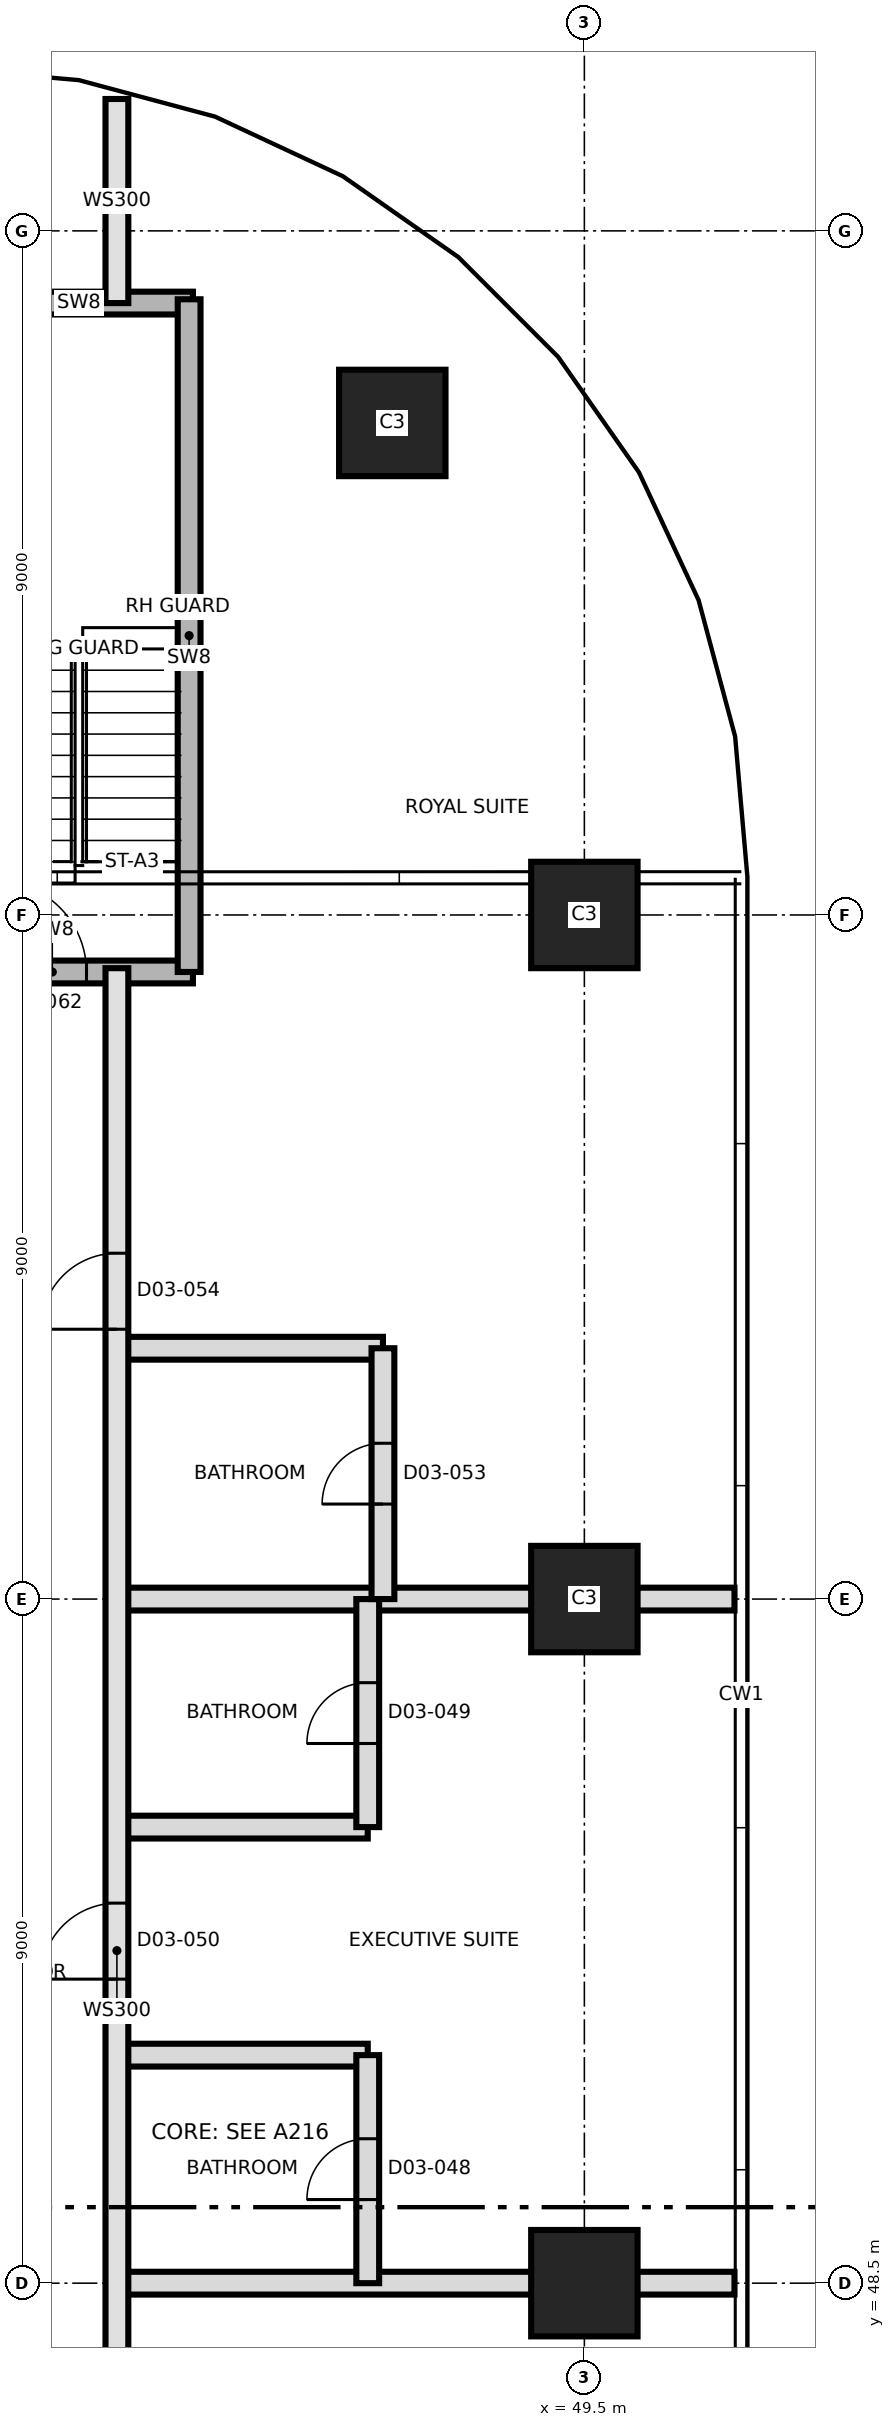
"""IFC4 building model, lengths in metres.
Left out: names, types, materials, properties, quantities, classifications, styles, units other than length and angle.
Written with IfcOpenShell. Run it as: python <this file> out.ifc"""

import sys

from ifc_helpers import new_model, si_unit, direction, frame, frame_2d, origin, origin_2d, place, context, subcontext, project, spatial, rectangle, extrude, element, fill, save


model = new_model("IFC4")
c1 = context("Model", 3, precision=1e-05, world=origin(), true_north=direction((0.0, 1.0)))
c2 = subcontext(c1, "Body", "Model", "MODEL_VIEW")
j1 = project(units=[si_unit("LENGTHUNIT", "METRE"), si_unit("PLANEANGLEUNIT", "RADIAN")], contexts=[c1])
p1 = place(None, origin())
s1 = spatial("IfcSite", under=j1, at=p1, CompositionType="ELEMENT")
p2 = place(p1, origin())
s2 = spatial("IfcBuilding", under=s1, at=p2, CompositionType="ELEMENT")
p3 = place(p2, frame((0.0, 0.0, 59.4)))
s3 = spatial("IfcBuildingStorey", under=s2, at=p3, CompositionType="ELEMENT", Elevation=59.4)
for number, where, z_axis, x_axis in (
    (1, (49.5, 48.5, 0.0), (0.0, 0.0, 1.0), (1.0, 0.0, 0.0)),
    (2, (49.5, 57.5, 0.0), (0.0, 0.0, 1.0), (1.0, 0.0, 0.0)),
    (3, (49.5, 66.5, 0.0), (0.0, 0.0, 1.0), (1.0, 0.0, 0.0)),
    (4, (46.973, 72.973, 0.0), (0.0, 0.0, 1.0), (1.0, 0.0, 0.0)),
):
    element("IfcColumn", number, at=place(p3, frame(where, z_axis=z_axis, x_axis=x_axis)), inside=s3, PredefinedType="COLUMN", context=c2, shape_type="SweptSolid", body=[
        extrude(rectangle(XDim=1.4, YDim=1.4, at=origin_2d()), origin(), (0.0, 0.0, 1.0), 3.7),
    ])
p4 = place(p3, frame((43.35, 48.5, 0.0), z_axis=(0.0, 0.0, 1.0), x_axis=(1.0, 0.0, 0.0)))
e5 = element("IfcWall", 5, at=p4, inside=s3, PredefinedType="PARTITIONING", context=c2, shape_type="SweptSolid", body=[
    extrude(rectangle(XDim=8.125, YDim=0.3, at=frame_2d((4.062, 0.0))), origin(), (0.0, 0.0, 1.0), 3.4),
])
for number, where, z_axis, x_axis in (
    (6, (43.35, 51.5, 0.0), (0.0, 0.0, 1.0), (1.0, 0.0, 0.0)),
    (7, (43.35, 54.5, 0.0), (0.0, 0.0, 1.0), (1.0, 0.0, 0.0)),
):
    element("IfcWall", number, at=place(p3, frame(where, z_axis=z_axis, x_axis=x_axis)), inside=s3, PredefinedType="PARTITIONING", context=c2, shape_type="SweptSolid", body=[
        extrude(rectangle(XDim=3.3, YDim=0.3, at=frame_2d((1.65, 0.0))), origin(), (0.0, 0.0, 1.0), 3.4),
    ])
p5 = place(p3, frame((43.35, 57.5, 0.0), z_axis=(0.0, 0.0, 1.0), x_axis=(1.0, 0.0, 0.0)))
e8 = element("IfcWall", 8, at=p5, inside=s3, PredefinedType="PARTITIONING", context=c2, shape_type="SweptSolid", body=[
    extrude(rectangle(XDim=8.125, YDim=0.3, at=frame_2d((4.062, 0.0))), origin(), (0.0, 0.0, 1.0), 3.4),
])
p6 = place(p3, frame((43.35, 60.8, 0.0), z_axis=(0.0, 0.0, 1.0), x_axis=(1.0, 0.0, 0.0)))
e9 = element("IfcWall", 9, at=p6, inside=s3, PredefinedType="PARTITIONING", context=c2, shape_type="SweptSolid", body=[
    extrude(rectangle(XDim=3.5, YDim=0.3, at=frame_2d((1.75, 0.0))), origin(), (0.0, 0.0, 1.0), 3.4),
])
p7 = place(p3, frame((40.65, 65.75, 0.0), z_axis=(0.0, 0.0, 1.0), x_axis=(1.0, 0.0, 0.0)))
e10 = element("IfcWall", 10, at=p7, inside=s3, PredefinedType="SHEAR", context=c2, shape_type="SweptSolid", body=[
    extrude(rectangle(XDim=3.7, YDim=0.3, at=frame_2d((1.85, 0.0))), origin(), (0.0, 0.0, 1.0), 3.4),
])
p8 = place(p7, frame((1.1, 0.0, 0.0)))
e11 = element("IfcOpeningElement", 11, at=p8, cuts=e10, PredefinedType="OPENING", context=c2, shape_type="SweptSolid", body=[
    extrude(rectangle(XDim=1.2, YDim=2.1, at=frame_2d((0.6, 1.05))), frame((0.0, 0.16, 0.0), z_axis=(0.0, -1.0, 0.0), x_axis=(1.0, 0.0, 0.0)), (0.0, 0.0, 1.0), 0.32),
])
p9 = place(p3, frame((41.35, 74.55, 0.0), z_axis=(0.0, 0.0, 1.0), x_axis=(1.0, 0.0, 0.0)))
e12 = element("IfcWall", 12, at=p9, inside=s3, PredefinedType="SHEAR", context=c2, shape_type="SweptSolid", body=[
    extrude(rectangle(XDim=3.0, YDim=0.3, at=frame_2d((1.5, 0.0))), origin(), (0.0, 0.0, 1.0), 3.4),
])
p10 = place(p3, frame((43.35, 39.95, 0.0), z_axis=(0.0, 0.0, 1.0), x_axis=(0.0, 1.0, 0.0)))
e13 = element("IfcWall", 13, at=p10, inside=s3, PredefinedType="SOLIDWALL", context=c2, shape_type="SweptSolid", body=[
    extrude(rectangle(XDim=25.85, YDim=0.3, at=frame_2d((12.925, 0.0))), origin(), (0.0, 0.0, 1.0), 3.4),
])
p11 = place(p10, frame((0.7, 0.0, 0.0)))
e14 = element("IfcOpeningElement", 14, at=p11, cuts=e13, PredefinedType="OPENING", context=c2, shape_type="SweptSolid", body=[
    extrude(rectangle(XDim=1.0, YDim=2.1, at=frame_2d((0.5, 1.05))), frame((0.0, 0.16, 0.0), z_axis=(0.0, -1.0, 0.0), x_axis=(1.0, 0.0, 0.0)), (0.0, 0.0, 1.0), 0.32),
])
p12 = place(p10, frame((6.55, 0.0, 0.0)))
e15 = element("IfcOpeningElement", 15, at=p12, cuts=e13, PredefinedType="OPENING", context=c2, shape_type="SweptSolid", body=[
    extrude(rectangle(XDim=1.0, YDim=2.1, at=frame_2d((0.5, 1.05))), frame((0.0, 0.16, 0.0), z_axis=(0.0, -1.0, 0.0), x_axis=(1.0, 0.0, 0.0)), (0.0, 0.0, 1.0), 0.32),
])
p13 = place(p10, frame((12.55, 0.0, 0.0)))
e16 = element("IfcOpeningElement", 16, at=p13, cuts=e13, PredefinedType="OPENING", context=c2, shape_type="SweptSolid", body=[
    extrude(rectangle(XDim=1.0, YDim=2.4, at=frame_2d((0.5, 1.2))), frame((0.0, 0.16, 0.0), z_axis=(0.0, -1.0, 0.0), x_axis=(1.0, 0.0, 0.0)), (0.0, 0.0, 1.0), 0.32),
])
p14 = place(p10, frame((21.1, 0.0, 0.0)))
e17 = element("IfcOpeningElement", 17, at=p14, cuts=e13, PredefinedType="OPENING", context=c2, shape_type="SweptSolid", body=[
    extrude(rectangle(XDim=1.0, YDim=2.4, at=frame_2d((0.5, 1.2))), frame((0.0, 0.16, 0.0), z_axis=(0.0, -1.0, 0.0), x_axis=(1.0, 0.0, 0.0)), (0.0, 0.0, 1.0), 0.32),
])
p15 = place(p3, frame((43.35, 74.55, 0.0), z_axis=(0.0, 0.0, 1.0), x_axis=(0.0, 1.0, 0.0)))
e18 = element("IfcWall", 18, at=p15, inside=s3, PredefinedType="SOLIDWALL", context=c2, shape_type="SweptSolid", body=[
    extrude(rectangle(XDim=2.685, YDim=0.3, at=frame_2d((1.343, 0.0))), origin(), (0.0, 0.0, 1.0), 3.4),
])
p16 = place(p3, frame((44.3, 65.75, 0.0), z_axis=(0.0, 0.0, 1.0), x_axis=(0.0, 1.0, 0.0)))
e19 = element("IfcWall", 19, at=p16, inside=s3, PredefinedType="SHEAR", context=c2, shape_type="SweptSolid", body=[
    extrude(rectangle(XDim=8.85, YDim=0.3, at=frame_2d((4.425, 0.0))), origin(), (0.0, 0.0, 1.0), 3.4),
])
p17 = place(p3, frame((46.65, 48.5, 0.0), z_axis=(0.0, 0.0, 1.0), x_axis=(0.0, 1.0, 0.0)))
e20 = element("IfcWall", 20, at=p17, inside=s3, PredefinedType="PARTITIONING", context=c2, shape_type="SweptSolid", body=[
    extrude(rectangle(XDim=3.0, YDim=0.3, at=frame_2d((1.5, 0.0))), origin(), (0.0, 0.0, 1.0), 3.4),
])
p18 = place(p17, frame((1.1, 0.0, 0.0)))
e21 = element("IfcOpeningElement", 21, at=p18, cuts=e20, PredefinedType="OPENING", context=c2, shape_type="SweptSolid", body=[
    extrude(rectangle(XDim=0.8, YDim=2.1, at=frame_2d((0.4, 1.05))), frame((0.0, 0.16, 0.0), z_axis=(0.0, -1.0, 0.0), x_axis=(1.0, 0.0, 0.0)), (0.0, 0.0, 1.0), 0.32),
])
p19 = place(p3, frame((46.65, 54.5, 0.0), z_axis=(0.0, 0.0, 1.0), x_axis=(0.0, 1.0, 0.0)))
e22 = element("IfcWall", 22, at=p19, inside=s3, PredefinedType="PARTITIONING", context=c2, shape_type="SweptSolid", body=[
    extrude(rectangle(XDim=3.0, YDim=0.3, at=frame_2d((1.5, 0.0))), origin(), (0.0, 0.0, 1.0), 3.4),
])
p20 = place(p19, frame((1.1, 0.0, 0.0)))
e23 = element("IfcOpeningElement", 23, at=p20, cuts=e22, PredefinedType="OPENING", context=c2, shape_type="SweptSolid", body=[
    extrude(rectangle(XDim=0.8, YDim=2.1, at=frame_2d((0.4, 1.05))), frame((0.0, 0.16, 0.0), z_axis=(0.0, -1.0, 0.0), x_axis=(1.0, 0.0, 0.0)), (0.0, 0.0, 1.0), 0.32),
])
p21 = place(p3, frame((46.85, 57.5, 0.0), z_axis=(0.0, 0.0, 1.0), x_axis=(0.0, 1.0, 0.0)))
e24 = element("IfcWall", 24, at=p21, inside=s3, PredefinedType="PARTITIONING", context=c2, shape_type="SweptSolid", body=[
    extrude(rectangle(XDim=3.3, YDim=0.3, at=frame_2d((1.65, 0.0))), origin(), (0.0, 0.0, 1.0), 3.4),
])
p22 = place(p21, frame((1.25, 0.0, 0.0)))
e25 = element("IfcOpeningElement", 25, at=p22, cuts=e24, PredefinedType="OPENING", context=c2, shape_type="SweptSolid", body=[
    extrude(rectangle(XDim=0.8, YDim=2.1, at=frame_2d((0.4, 1.05))), frame((0.0, 0.16, 0.0), z_axis=(0.0, -1.0, 0.0), x_axis=(1.0, 0.0, 0.0)), (0.0, 0.0, 1.0), 0.32),
])
p23 = place(p18, origin())
e26 = element("IfcDoor", 26, at=p23, inside=s3, OperationType="SINGLE_SWING_RIGHT", PredefinedType="DOOR", context=c2, shape_type="SweptSolid", body=[
    extrude(rectangle(XDim=0.8, YDim=2.1, at=frame_2d((0.4, 1.05))), frame((0.0, 0.025, 0.0), z_axis=(0.0, -1.0, 0.0), x_axis=(1.0, 0.0, 0.0)), (0.0, 0.0, 1.0), 0.05),
])
fill(e21, e26)
p24 = place(p20, origin())
e27 = element("IfcDoor", 27, at=p24, inside=s3, OperationType="SINGLE_SWING_LEFT", PredefinedType="DOOR", context=c2, shape_type="SweptSolid", body=[
    extrude(rectangle(XDim=0.8, YDim=2.1, at=frame_2d((0.4, 1.05))), frame((0.0, 0.025, 0.0), z_axis=(0.0, -1.0, 0.0), x_axis=(1.0, 0.0, 0.0)), (0.0, 0.0, 1.0), 0.05),
])
fill(e23, e27)
p25 = place(p13, origin())
e28 = element("IfcDoor", 28, at=p25, inside=s3, OperationType="SINGLE_SWING_LEFT", PredefinedType="DOOR", context=c2, shape_type="SweptSolid", body=[
    extrude(rectangle(XDim=1.0, YDim=2.4, at=frame_2d((0.5, 1.2))), frame((0.0, 0.025, 0.0), z_axis=(0.0, -1.0, 0.0), x_axis=(1.0, 0.0, 0.0)), (0.0, 0.0, 1.0), 0.05),
])
fill(e16, e28)
p26 = place(p22, origin())
e29 = element("IfcDoor", 29, at=p26, inside=s3, OperationType="SINGLE_SWING_LEFT", PredefinedType="DOOR", context=c2, shape_type="SweptSolid", body=[
    extrude(rectangle(XDim=0.8, YDim=2.1, at=frame_2d((0.4, 1.05))), frame((0.0, 0.025, 0.0), z_axis=(0.0, -1.0, 0.0), x_axis=(1.0, 0.0, 0.0)), (0.0, 0.0, 1.0), 0.05),
])
fill(e25, e29)
p27 = place(p14, origin())
e30 = element("IfcDoor", 30, at=p27, inside=s3, OperationType="SINGLE_SWING_LEFT", PredefinedType="DOOR", context=c2, shape_type="SweptSolid", body=[
    extrude(rectangle(XDim=1.0, YDim=2.4, at=frame_2d((0.5, 1.2))), frame((0.0, 0.025, 0.0), z_axis=(0.0, -1.0, 0.0), x_axis=(1.0, 0.0, 0.0)), (0.0, 0.0, 1.0), 0.05),
])
fill(e17, e30)
p28 = place(p8, origin())
e31 = element("IfcDoor", 31, at=p28, inside=s3, OperationType="SINGLE_SWING_RIGHT", PredefinedType="DOOR", context=c2, shape_type="SweptSolid", body=[
    extrude(rectangle(XDim=1.2, YDim=2.1, at=frame_2d((0.6, 1.05))), frame((0.0, 0.025, 0.0), z_axis=(0.0, -1.0, 0.0), x_axis=(1.0, 0.0, 0.0)), (0.0, 0.0, 1.0), 0.05),
])
fill(e11, e31)
save(model, sys.argv[1])
